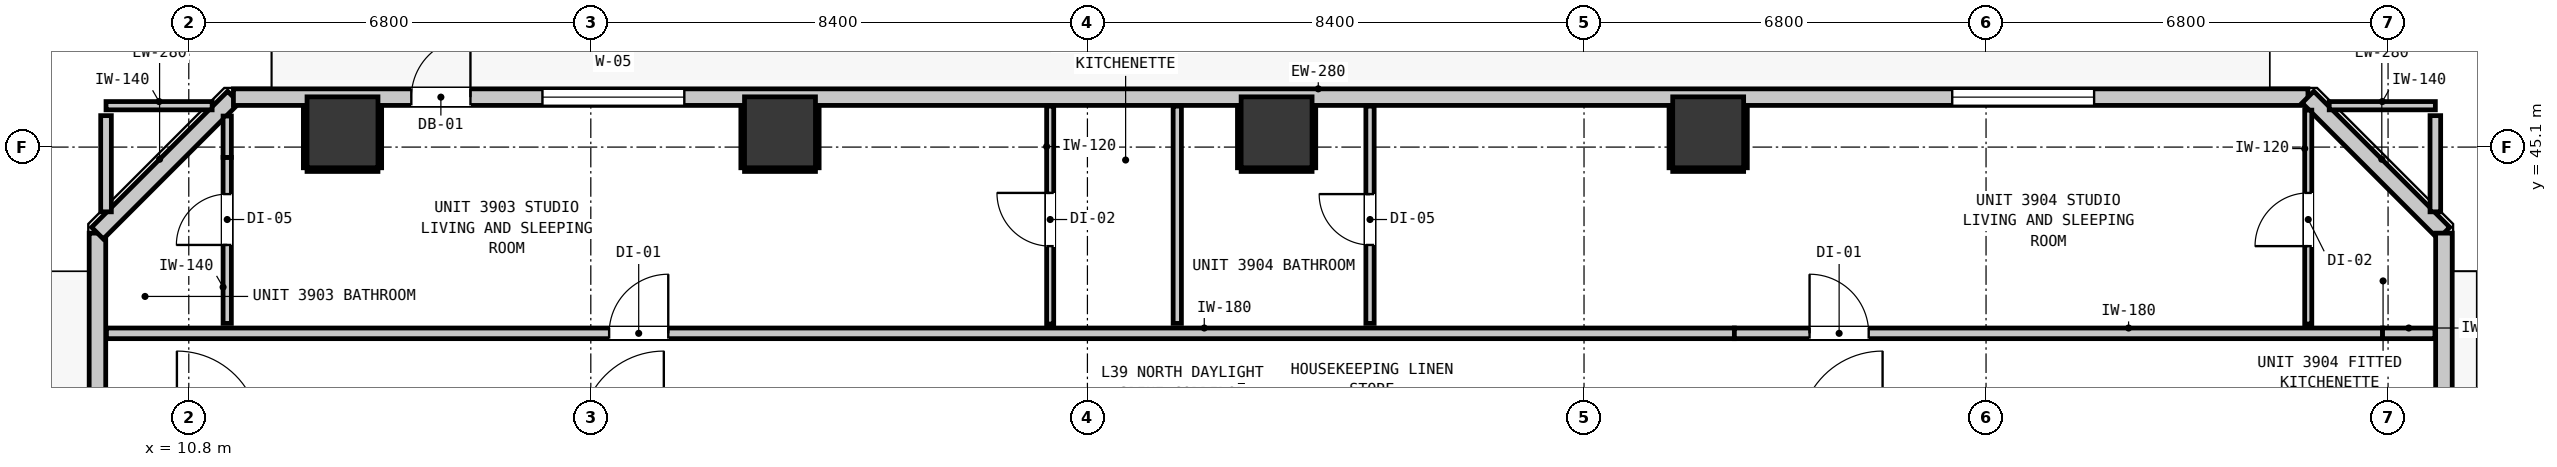
"""IFC4 building model, lengths in metres.
Left out: names, types, materials, properties, quantities, classifications, styles, units other than length and angle.
Written with IfcOpenShell. Run it as: python <this file> out.ifc"""

import sys

from ifc_helpers import new_model, si_unit, direction, frame, frame_2d, origin, origin_2d, place, context, subcontext, project, spatial, rectangle, extrude, element, fill, save


model = new_model("IFC4")
c1 = context("Model", 3, precision=1e-05, world=origin(), true_north=direction((0.0, 1.0)))
c2 = subcontext(c1, "Body", "Model", "MODEL_VIEW")
j1 = project(units=[si_unit("LENGTHUNIT", "METRE"), si_unit("PLANEANGLEUNIT", "RADIAN")], contexts=[c1])
p1 = place(None, origin())
s1 = spatial("IfcSite", under=j1, at=p1, CompositionType="ELEMENT")
p2 = place(p1, origin())
s2 = spatial("IfcBuilding", under=s1, at=p2, CompositionType="ELEMENT")
p3 = place(p2, frame((0.0, 0.0, 135.96)))
s3 = spatial("IfcBuildingStorey", under=s2, at=p3, CompositionType="ELEMENT", Elevation=135.96)
for number, where, z_axis, x_axis in (
    (1, (13.4, 45.35, 0.0), (0.0, 0.0, 1.0), (1.0, 0.0, 0.0)),
    (2, (20.8, 45.35, 0.0), (0.0, 0.0, 1.0), (1.0, 0.0, 0.0)),
    (3, (29.2, 45.35, 0.0), (0.0, 0.0, 1.0), (1.0, 0.0, 0.0)),
    (4, (36.5, 45.35, 0.0), (0.0, 0.0, 1.0), (1.0, 0.0, 0.0)),
):
    element("IfcColumn", number, at=place(p3, frame(where, z_axis=z_axis, x_axis=x_axis)), inside=s3, PredefinedType="COLUMN", context=c2, shape_type="SweptSolid", body=[
        extrude(rectangle(XDim=1.2, YDim=1.2, at=origin_2d()), origin(), (0.0, 0.0, 1.0), 3.32),
    ])
p4 = place(p3, frame((9.255, 11.355, 0.0), z_axis=(0.0, 0.0, 1.0), x_axis=(0.0, 1.0, 0.0)))
e5 = element("IfcWall", 5, at=p4, inside=s3, PredefinedType="STANDARD", context=c2, shape_type="SweptSolid", body=[
    extrude(rectangle(XDim=32.29, YDim=0.28, at=frame_2d((16.145, 0.0))), origin(), (0.0, 0.0, 1.0), 3.08),
])
p5 = place(p4, frame((5.818, 0.0, 0.0)))
e6 = element("IfcOpeningElement", 6, at=p5, cuts=e5, PredefinedType="OPENING", context=c2, shape_type="SweptSolid", body=[
    extrude(rectangle(XDim=1.0, YDim=2.15, at=frame_2d((0.5, 1.075))), frame((0.0, 0.15, 0.0), z_axis=(0.0, -1.0, 0.0), x_axis=(1.0, 0.0, 0.0)), (0.0, 0.0, 1.0), 0.3),
])
p6 = place(p4, frame((0.544, 0.0, 0.85)))
e7 = element("IfcOpeningElement", 7, at=p6, cuts=e5, PredefinedType="OPENING", context=c2, shape_type="SweptSolid", body=[
    extrude(rectangle(XDim=1.05, YDim=1.65, at=frame_2d((0.525, 0.825))), frame((0.0, 0.15, 0.0), z_axis=(0.0, -1.0, 0.0), x_axis=(1.0, 0.0, 0.0)), (0.0, 0.0, 1.0), 0.3),
])
p7 = place(p3, frame((9.255, 43.645, 0.0), z_axis=(0.0, 0.0, 1.0), x_axis=(0.707106781187, 0.707106781187, 0.0)))
e8 = element("IfcWall", 8, at=p7, inside=s3, PredefinedType="STANDARD", context=c2, shape_type="SweptSolid", body=[
    extrude(rectangle(XDim=3.253, YDim=0.28, at=frame_2d((1.626, 0.0))), origin(), (0.0, 0.0, 1.0), 3.08),
])
p8 = place(p3, frame((11.555, 45.945, 0.0), z_axis=(0.0, 0.0, 1.0), x_axis=(1.0, 0.0, 0.0)))
e9 = element("IfcWall", 9, at=p8, inside=s3, PredefinedType="STANDARD", context=c2, shape_type="SweptSolid", body=[
    extrude(rectangle(XDim=35.09, YDim=0.28, at=frame_2d((17.545, 0.0))), origin(), (0.0, 0.0, 1.0), 3.08),
])
p9 = place(p8, frame((3.009, 0.0, 0.0)))
e10 = element("IfcOpeningElement", 10, at=p9, cuts=e9, PredefinedType="OPENING", context=c2, shape_type="SweptSolid", body=[
    extrude(rectangle(XDim=1.0, YDim=2.15, at=frame_2d((0.5, 1.075))), frame((0.0, 0.15, 0.0), z_axis=(0.0, -1.0, 0.0), x_axis=(1.0, 0.0, 0.0)), (0.0, 0.0, 1.0), 0.3),
])
p10 = place(p8, frame((5.227, 0.0, 0.85)))
e11 = element("IfcOpeningElement", 11, at=p10, cuts=e9, PredefinedType="OPENING", context=c2, shape_type="SweptSolid", body=[
    extrude(rectangle(XDim=2.4, YDim=1.95, at=frame_2d((1.2, 0.975))), frame((0.0, 0.15, 0.0), z_axis=(0.0, -1.0, 0.0), x_axis=(1.0, 0.0, 0.0)), (0.0, 0.0, 1.0), 0.3),
])
p11 = place(p8, frame((29.073, 0.0, 0.85)))
e12 = element("IfcOpeningElement", 12, at=p11, cuts=e9, PredefinedType="OPENING", context=c2, shape_type="SweptSolid", body=[
    extrude(rectangle(XDim=2.4, YDim=1.95, at=frame_2d((1.2, 0.975))), frame((0.0, 0.15, 0.0), z_axis=(0.0, -1.0, 0.0), x_axis=(1.0, 0.0, 0.0)), (0.0, 0.0, 1.0), 0.3),
])
p12 = place(p3, frame((46.645, 45.945, 0.0), z_axis=(0.0, 0.0, 1.0), x_axis=(0.707106781187, -0.707106781187, 0.0)))
e13 = element("IfcWall", 13, at=p12, inside=s3, PredefinedType="STANDARD", context=c2, shape_type="SweptSolid", body=[
    extrude(rectangle(XDim=3.253, YDim=0.28, at=frame_2d((1.626, 0.0))), origin(), (0.0, 0.0, 1.0), 3.08),
])
p13 = place(p3, frame((48.945, 43.645, 0.0), z_axis=(0.0, 0.0, 1.0), x_axis=(0.0, -1.0, 0.0)))
e14 = element("IfcWall", 14, at=p13, inside=s3, PredefinedType="STANDARD", context=c2, shape_type="SweptSolid", body=[
    extrude(rectangle(XDim=32.29, YDim=0.28, at=frame_2d((16.145, 0.0))), origin(), (0.0, 0.0, 1.0), 3.08),
])
p14 = place(p13, frame((5.467, 0.0, 0.0)))
e15 = element("IfcOpeningElement", 15, at=p14, cuts=e14, PredefinedType="OPENING", context=c2, shape_type="SweptSolid", body=[
    extrude(rectangle(XDim=1.0, YDim=2.15, at=frame_2d((0.5, 1.075))), frame((0.0, 0.15, 0.0), z_axis=(0.0, -1.0, 0.0), x_axis=(1.0, 0.0, 0.0)), (0.0, 0.0, 1.0), 0.3),
])
p15 = place(p13, frame((30.696, 0.0, 0.85)))
e16 = element("IfcOpeningElement", 16, at=p15, cuts=e14, PredefinedType="OPENING", context=c2, shape_type="SweptSolid", body=[
    extrude(rectangle(XDim=1.05, YDim=1.65, at=frame_2d((0.525, 0.825))), frame((0.0, 0.15, 0.0), z_axis=(0.0, -1.0, 0.0), x_axis=(1.0, 0.0, 0.0)), (0.0, 0.0, 1.0), 0.3),
])
p16 = place(p13, frame((14.461, 0.0, 0.85)))
e17 = element("IfcOpeningElement", 17, at=p16, cuts=e14, PredefinedType="OPENING", context=c2, shape_type="SweptSolid", body=[
    extrude(rectangle(XDim=2.4, YDim=1.95, at=frame_2d((1.2, 0.975))), frame((0.0, 0.15, 0.0), z_axis=(0.0, -1.0, 0.0), x_axis=(1.0, 0.0, 0.0)), (0.0, 0.0, 1.0), 0.3),
])
p17 = place(p13, frame((7.106, 0.0, 0.85)))
e18 = element("IfcOpeningElement", 18, at=p17, cuts=e14, PredefinedType="OPENING", context=c2, shape_type="SweptSolid", body=[
    extrude(rectangle(XDim=1.05, YDim=1.65, at=frame_2d((0.525, 0.825))), frame((0.0, 0.15, 0.0), z_axis=(0.0, -1.0, 0.0), x_axis=(1.0, 0.0, 0.0)), (0.0, 0.0, 1.0), 0.3),
])
p18 = place(p3, frame((9.407, 41.95, 0.0), z_axis=(0.0, 0.0, 1.0), x_axis=(1.0, 0.0, 0.0)))
e19 = element("IfcWall", 19, at=p18, inside=s3, PredefinedType="PARTITIONING", context=c2, shape_type="SweptSolid", body=[
    extrude(rectangle(XDim=27.536, YDim=0.18, at=frame_2d((13.768, 0.0))), origin(), (0.0, 0.0, 1.0), 3.08),
])
p19 = place(p18, frame((8.503, 0.0, 0.0)))
e20 = element("IfcOpeningElement", 20, at=p19, cuts=e19, PredefinedType="OPENING", context=c2, shape_type="SweptSolid", body=[
    extrude(rectangle(XDim=1.0, YDim=2.15, at=frame_2d((0.5, 1.075))), frame((0.0, 0.1, 0.0), z_axis=(0.0, -1.0, 0.0), x_axis=(1.0, 0.0, 0.0)), (0.0, 0.0, 1.0), 0.2),
])
p20 = place(p3, frame((36.943, 41.95, 0.0), z_axis=(0.0, 0.0, 1.0), x_axis=(1.0, 0.0, 0.0)))
e21 = element("IfcWall", 21, at=p20, inside=s3, PredefinedType="PARTITIONING", context=c2, shape_type="SweptSolid", body=[
    extrude(rectangle(XDim=10.964, YDim=0.18, at=frame_2d((5.482, 0.0))), origin(), (0.0, 0.0, 1.0), 2.565),
])
p21 = place(p20, frame((1.272, 0.0, 0.0)))
e22 = element("IfcOpeningElement", 22, at=p21, cuts=e21, PredefinedType="OPENING", context=c2, shape_type="SweptSolid", body=[
    extrude(rectangle(XDim=1.0, YDim=2.15, at=frame_2d((0.5, 1.075))), frame((0.0, 0.1, 0.0), z_axis=(0.0, -1.0, 0.0), x_axis=(1.0, 0.0, 0.0)), (0.0, 0.0, 1.0), 0.2),
])
p22 = place(p3, frame((47.907, 41.95, 0.0), z_axis=(0.0, 0.0, 1.0), x_axis=(1.0, 0.0, 0.0)))
e23 = element("IfcWall", 23, at=p22, inside=s3, PredefinedType="PARTITIONING", context=c2, shape_type="SweptSolid", body=[
    extrude(rectangle(XDim=0.886, YDim=0.18, at=frame_2d((0.443, 0.0))), origin(), (0.0, 0.0, 1.0), 3.08),
])
for number, where, z_axis, x_axis in (
    (24, (9.4, 45.8, 0.0), (0.0, 0.0, 1.0), (1.0, 0.0, 0.0)),
    (25, (47.005, 45.8, 0.0), (0.0, 0.0, 1.0), (1.0, 0.0, 0.0)),
):
    element("IfcWall", number, at=place(p3, frame(where, z_axis=z_axis, x_axis=x_axis)), inside=s3, PredefinedType="PARTITIONING", context=c2, shape_type="SweptSolid", body=[
        extrude(rectangle(XDim=1.795, YDim=0.14, at=frame_2d((0.897, 0.0))), origin(), (0.0, 0.0, 1.0), 3.08),
    ])
for number, where, z_axis, x_axis in (
    (26, (9.4, 44.005, 0.0), (0.0, 0.0, 1.0), (0.0, 1.0, 0.0)),
    (27, (48.8, 44.005, 0.0), (0.0, 0.0, 1.0), (0.0, 1.0, 0.0)),
):
    element("IfcWall", number, at=place(p3, frame(where, z_axis=z_axis, x_axis=x_axis)), inside=s3, PredefinedType="PARTITIONING", context=c2, shape_type="SweptSolid", body=[
        extrude(rectangle(XDim=1.627, YDim=0.18, at=frame_2d((0.813, 0.0))), origin(), (0.0, 0.0, 1.0), 3.08),
    ])
p23 = place(p3, frame((11.45, 42.118, 0.0), z_axis=(0.0, 0.0, 1.0), x_axis=(0.0, 1.0, 0.0)))
e28 = element("IfcWall", 28, at=p23, inside=s3, PredefinedType="PARTITIONING", context=c2, shape_type="SweptSolid", body=[
    extrude(rectangle(XDim=2.808, YDim=0.14, at=frame_2d((1.404, 0.0))), origin(), (0.0, 0.0, 1.0), 2.565),
])
p24 = place(p23, frame((1.327, 0.0, 0.0)))
e29 = element("IfcOpeningElement", 29, at=p24, cuts=e28, PredefinedType="OPENING", context=c2, shape_type="SweptSolid", body=[
    extrude(rectangle(XDim=0.86, YDim=2.02, at=frame_2d((0.43, 1.01))), frame((0.0, 0.08, 0.0), z_axis=(0.0, -1.0, 0.0), x_axis=(1.0, 0.0, 0.0)), (0.0, 0.0, 1.0), 0.16),
])
p25 = place(p3, frame((11.45, 44.926, 0.0), z_axis=(0.0, 0.0, 1.0), x_axis=(0.0, 1.0, 0.0)))
e30 = element("IfcWall", 30, at=p25, inside=s3, PredefinedType="PARTITIONING", context=c2, shape_type="SweptSolid", body=[
    extrude(rectangle(XDim=0.699, YDim=0.14, at=frame_2d((0.35, 0.0))), origin(), (0.0, 0.0, 1.0), 3.08),
])
p26 = place(p3, frame((27.52, 42.118, 0.0), z_axis=(0.0, 0.0, 1.0), x_axis=(0.0, 1.0, 0.0)))
e31 = element("IfcWall", 31, at=p26, inside=s3, PredefinedType="PARTITIONING", context=c2, shape_type="SweptSolid", body=[
    extrude(rectangle(XDim=3.675, YDim=0.14, at=frame_2d((1.837, 0.0))), origin(), (0.0, 0.0, 1.0), 3.08),
])
p27 = place(p3, frame((30.78, 42.118, 0.0), z_axis=(0.0, 0.0, 1.0), x_axis=(0.0, 1.0, 0.0)))
e32 = element("IfcWall", 32, at=p27, inside=s3, PredefinedType="PARTITIONING", context=c2, shape_type="SweptSolid", body=[
    extrude(rectangle(XDim=3.675, YDim=0.14, at=frame_2d((1.837, 0.0))), origin(), (0.0, 0.0, 1.0), 3.08),
])
p28 = place(p27, frame((1.327, 0.0, 0.0)))
e33 = element("IfcOpeningElement", 33, at=p28, cuts=e32, PredefinedType="OPENING", context=c2, shape_type="SweptSolid", body=[
    extrude(rectangle(XDim=0.86, YDim=2.02, at=frame_2d((0.43, 1.01))), frame((0.0, 0.08, 0.0), z_axis=(0.0, -1.0, 0.0), x_axis=(1.0, 0.0, 0.0)), (0.0, 0.0, 1.0), 0.16),
])
p29 = place(p3, frame((25.37, 42.108, 0.0), z_axis=(0.0, 0.0, 1.0), x_axis=(0.0, 1.0, 0.0)))
e34 = element("IfcWall", 34, at=p29, inside=s3, PredefinedType="PARTITIONING", context=c2, shape_type="SweptSolid", body=[
    extrude(rectangle(XDim=3.685, YDim=0.12, at=frame_2d((1.843, 0.0))), origin(), (0.0, 0.0, 1.0), 3.08),
])
p30 = place(p29, frame((1.317, 0.0, 0.0)))
e35 = element("IfcOpeningElement", 35, at=p30, cuts=e34, PredefinedType="OPENING", context=c2, shape_type="SweptSolid", body=[
    extrude(rectangle(XDim=0.9, YDim=2.1, at=frame_2d((0.45, 1.05))), frame((0.0, 0.07, 0.0), z_axis=(0.0, -1.0, 0.0), x_axis=(1.0, 0.0, 0.0)), (0.0, 0.0, 1.0), 0.14),
])
p31 = place(p3, frame((46.65, 42.108, 0.0), z_axis=(0.0, 0.0, 1.0), x_axis=(0.0, 1.0, 0.0)))
e36 = element("IfcWall", 36, at=p31, inside=s3, PredefinedType="PARTITIONING", context=c2, shape_type="SweptSolid", body=[
    extrude(rectangle(XDim=3.617, YDim=0.12, at=frame_2d((1.809, 0.0))), origin(), (0.0, 0.0, 1.0), 3.08),
])
p32 = place(p31, frame((1.317, 0.0, 0.0)))
e37 = element("IfcOpeningElement", 37, at=p32, cuts=e36, PredefinedType="OPENING", context=c2, shape_type="SweptSolid", body=[
    extrude(rectangle(XDim=0.9, YDim=2.1, at=frame_2d((0.45, 1.05))), frame((0.0, 0.07, 0.0), z_axis=(0.0, -1.0, 0.0), x_axis=(1.0, 0.0, 0.0)), (0.0, 0.0, 1.0), 0.14),
])
p33 = place(p3, frame((12.8, 44.718, 0.0), z_axis=(0.0, 0.0, 1.0), x_axis=(1.0, 0.0, 0.0)))
e38 = element("IfcWall", 38, at=p33, inside=s3, PredefinedType="PARTITIONING", context=c2, shape_type="SweptSolid", body=[
    extrude(rectangle(XDim=1.2, YDim=0.06, at=frame_2d((0.6, 0.0))), origin(), (0.0, 0.0, 1.0), 1.45),
])
for number, where, z_axis, x_axis in (
    (39, (12.768, 44.75, 0.0), (0.0, 0.0, 1.0), (0.0, 1.0, 0.0)),
    (40, (14.032, 44.75, 0.0), (0.0, 0.0, 1.0), (0.0, 1.0, 0.0)),
):
    element("IfcWall", number, at=place(p3, frame(where, z_axis=z_axis, x_axis=x_axis)), inside=s3, PredefinedType="PARTITIONING", context=c2, shape_type="SweptSolid", body=[
        extrude(rectangle(XDim=1.04, YDim=0.06, at=frame_2d((0.52, 0.0))), origin(), (0.0, 0.0, 1.0), 1.45),
    ])
p34 = place(p3, frame((20.2, 44.718, 0.0), z_axis=(0.0, 0.0, 1.0), x_axis=(1.0, 0.0, 0.0)))
e41 = element("IfcWall", 41, at=p34, inside=s3, PredefinedType="PARTITIONING", context=c2, shape_type="SweptSolid", body=[
    extrude(rectangle(XDim=1.2, YDim=0.06, at=frame_2d((0.6, 0.0))), origin(), (0.0, 0.0, 1.0), 1.45),
])
for number, where, z_axis, x_axis in (
    (42, (20.168, 44.75, 0.0), (0.0, 0.0, 1.0), (0.0, 1.0, 0.0)),
    (43, (21.432, 44.75, 0.0), (0.0, 0.0, 1.0), (0.0, 1.0, 0.0)),
):
    element("IfcWall", number, at=place(p3, frame(where, z_axis=z_axis, x_axis=x_axis)), inside=s3, PredefinedType="PARTITIONING", context=c2, shape_type="SweptSolid", body=[
        extrude(rectangle(XDim=1.04, YDim=0.06, at=frame_2d((0.52, 0.0))), origin(), (0.0, 0.0, 1.0), 1.45),
    ])
p35 = place(p3, frame((28.6, 44.718, 0.0), z_axis=(0.0, 0.0, 1.0), x_axis=(1.0, 0.0, 0.0)))
e44 = element("IfcWall", 44, at=p35, inside=s3, PredefinedType="PARTITIONING", context=c2, shape_type="SweptSolid", body=[
    extrude(rectangle(XDim=1.2, YDim=0.06, at=frame_2d((0.6, 0.0))), origin(), (0.0, 0.0, 1.0), 1.45),
])
for number, where, z_axis, x_axis in (
    (45, (28.568, 44.75, 0.0), (0.0, 0.0, 1.0), (0.0, 1.0, 0.0)),
    (46, (29.832, 44.75, 0.0), (0.0, 0.0, 1.0), (0.0, 1.0, 0.0)),
):
    element("IfcWall", number, at=place(p3, frame(where, z_axis=z_axis, x_axis=x_axis)), inside=s3, PredefinedType="PARTITIONING", context=c2, shape_type="SweptSolid", body=[
        extrude(rectangle(XDim=1.04, YDim=0.06, at=frame_2d((0.52, 0.0))), origin(), (0.0, 0.0, 1.0), 1.45),
    ])
p36 = place(p3, frame((35.9, 44.718, 0.0), z_axis=(0.0, 0.0, 1.0), x_axis=(1.0, 0.0, 0.0)))
e47 = element("IfcWall", 47, at=p36, inside=s3, PredefinedType="PARTITIONING", context=c2, shape_type="SweptSolid", body=[
    extrude(rectangle(XDim=1.2, YDim=0.06, at=frame_2d((0.6, 0.0))), origin(), (0.0, 0.0, 1.0), 1.45),
])
for number, where, z_axis, x_axis in (
    (48, (35.868, 44.75, 0.0), (0.0, 0.0, 1.0), (0.0, 1.0, 0.0)),
    (49, (37.132, 44.75, 0.0), (0.0, 0.0, 1.0), (0.0, 1.0, 0.0)),
):
    element("IfcWall", number, at=place(p3, frame(where, z_axis=z_axis, x_axis=x_axis)), inside=s3, PredefinedType="PARTITIONING", context=c2, shape_type="SweptSolid", body=[
        extrude(rectangle(XDim=1.04, YDim=0.06, at=frame_2d((0.52, 0.0))), origin(), (0.0, 0.0, 1.0), 1.45),
    ])
p37 = place(p9, origin())
e50 = element("IfcDoor", 50, at=p37, inside=s3, OperationType="SINGLE_SWING_RIGHT", PredefinedType="DOOR", context=c2, shape_type="SweptSolid", body=[
    extrude(rectangle(XDim=1.0, YDim=2.15, at=frame_2d((0.5, 1.075))), frame((0.0, 0.025, 0.0), z_axis=(0.0, -1.0, 0.0), x_axis=(1.0, 0.0, 0.0)), (0.0, 0.0, 1.0), 0.05),
])
fill(e10, e50)
p38 = place(p10, origin())
e51 = element("IfcWindow", 51, at=p38, inside=s3, PartitioningType="SINGLE_PANEL", PredefinedType="WINDOW", context=c2, shape_type="SweptSolid", body=[
    extrude(rectangle(XDim=2.4, YDim=1.95, at=frame_2d((1.2, 0.975))), frame((0.0, 0.03, 0.0), z_axis=(0.0, -1.0, 0.0), x_axis=(1.0, 0.0, 0.0)), (0.0, 0.0, 1.0), 0.06),
])
fill(e11, e51)
p39 = place(p11, origin())
e52 = element("IfcWindow", 52, at=p39, inside=s3, PartitioningType="SINGLE_PANEL", PredefinedType="WINDOW", context=c2, shape_type="SweptSolid", body=[
    extrude(rectangle(XDim=2.4, YDim=1.95, at=frame_2d((1.2, 0.975))), frame((0.0, 0.03, 0.0), z_axis=(0.0, -1.0, 0.0), x_axis=(1.0, 0.0, 0.0)), (0.0, 0.0, 1.0), 0.06),
])
fill(e12, e52)
p40 = place(p19, origin())
e53 = element("IfcDoor", 53, at=p40, inside=s3, OperationType="SINGLE_SWING_RIGHT", PredefinedType="DOOR", context=c2, shape_type="SweptSolid", body=[
    extrude(rectangle(XDim=1.0, YDim=2.15, at=frame_2d((0.5, 1.075))), frame((0.0, 0.025, 0.0), z_axis=(0.0, -1.0, 0.0), x_axis=(1.0, 0.0, 0.0)), (0.0, 0.0, 1.0), 0.05),
])
fill(e20, e53)
p41 = place(p24, origin())
e54 = element("IfcDoor", 54, at=p41, inside=s3, OperationType="SINGLE_SWING_LEFT", PredefinedType="DOOR", context=c2, shape_type="SweptSolid", body=[
    extrude(rectangle(XDim=0.86, YDim=2.02, at=frame_2d((0.43, 1.01))), frame((0.0, 0.025, 0.0), z_axis=(0.0, -1.0, 0.0), x_axis=(1.0, 0.0, 0.0)), (0.0, 0.0, 1.0), 0.05),
])
fill(e29, e54)
p42 = place(p30, origin())
e55 = element("IfcDoor", 55, at=p42, inside=s3, OperationType="SINGLE_SWING_RIGHT", PredefinedType="DOOR", context=c2, shape_type="SweptSolid", body=[
    extrude(rectangle(XDim=0.9, YDim=2.1, at=frame_2d((0.45, 1.05))), frame((0.0, 0.025, 0.0), z_axis=(0.0, -1.0, 0.0), x_axis=(1.0, 0.0, 0.0)), (0.0, 0.0, 1.0), 0.05),
])
fill(e35, e55)
p43 = place(p21, origin())
e56 = element("IfcDoor", 56, at=p43, inside=s3, OperationType="SINGLE_SWING_LEFT", PredefinedType="DOOR", context=c2, shape_type="SweptSolid", body=[
    extrude(rectangle(XDim=1.0, YDim=2.15, at=frame_2d((0.5, 1.075))), frame((0.0, 0.025, 0.0), z_axis=(0.0, -1.0, 0.0), x_axis=(1.0, 0.0, 0.0)), (0.0, 0.0, 1.0), 0.05),
])
fill(e22, e56)
p44 = place(p28, origin())
e57 = element("IfcDoor", 57, at=p44, inside=s3, OperationType="SINGLE_SWING_RIGHT", PredefinedType="DOOR", context=c2, shape_type="SweptSolid", body=[
    extrude(rectangle(XDim=0.86, YDim=2.02, at=frame_2d((0.43, 1.01))), frame((0.0, 0.025, 0.0), z_axis=(0.0, -1.0, 0.0), x_axis=(1.0, 0.0, 0.0)), (0.0, 0.0, 1.0), 0.05),
])
fill(e33, e57)
p45 = place(p32, origin())
e58 = element("IfcDoor", 58, at=p45, inside=s3, OperationType="SINGLE_SWING_LEFT", PredefinedType="DOOR", context=c2, shape_type="SweptSolid", body=[
    extrude(rectangle(XDim=0.9, YDim=2.1, at=frame_2d((0.45, 1.05))), frame((0.0, 0.025, 0.0), z_axis=(0.0, -1.0, 0.0), x_axis=(1.0, 0.0, 0.0)), (0.0, 0.0, 1.0), 0.05),
])
fill(e37, e58)
save(model, sys.argv[1])
